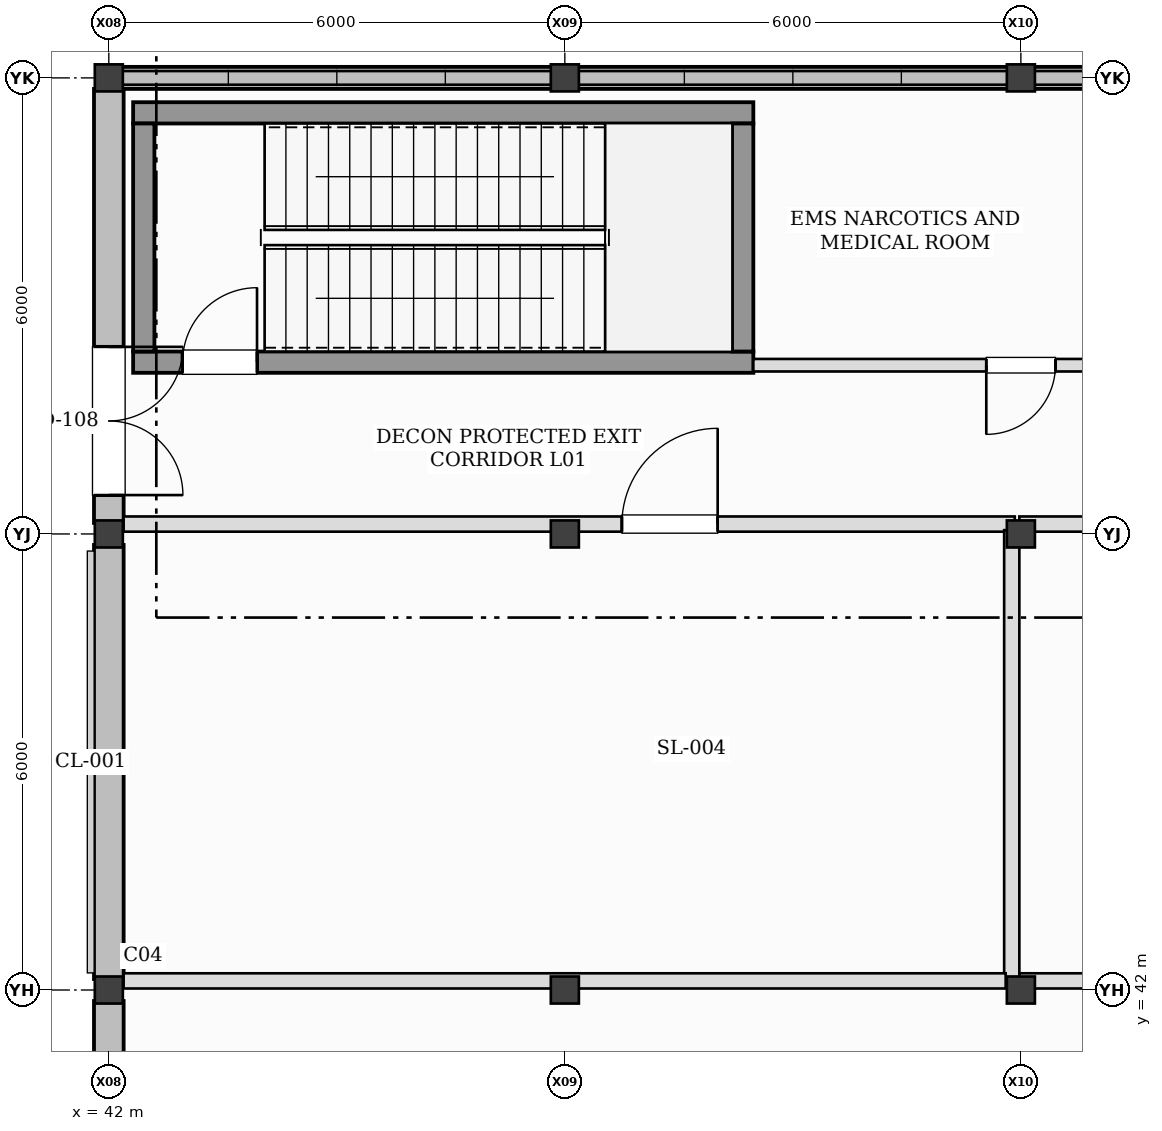
"""IFC4 building model, lengths in metres.
Left out: names, types, materials, properties, quantities, classifications, styles, units other than length and angle.
Written with IfcOpenShell. Run it as: python <this file> out.ifc"""

import sys

from ifc_helpers import new_model, si_unit, direction, frame, frame_2d, origin, origin_2d, place, context, subcontext, project, spatial, rectangle, i_section, extrude, element, fill, save


model = new_model("IFC4")
c1 = context("Model", 3, precision=1e-05, world=origin(), true_north=direction((0.0, 1.0)))
c2 = subcontext(c1, "Body", "Model", "MODEL_VIEW")
j1 = project(units=[si_unit("LENGTHUNIT", "METRE"), si_unit("PLANEANGLEUNIT", "RADIAN")], contexts=[c1])
p1 = place(None, origin())
s1 = spatial("IfcSite", under=j1, at=p1, CompositionType="ELEMENT")
p2 = place(p1, origin())
s2 = spatial("IfcBuilding", under=s1, at=p2, CompositionType="ELEMENT")
p3 = place(p2, origin())
s3 = spatial("IfcBuildingStorey", under=s2, at=p3, CompositionType="ELEMENT", Elevation=0.0)
for number, where, z_axis, x_axis in (
    (1, (42.0, 42.0, -0.41), (0.0, 0.0, 1.0), (1.0, 0.0, 0.0)),
    (2, (42.0, 48.0, -0.41), (0.0, 0.0, 1.0), (1.0, 0.0, 0.0)),
    (3, (42.0, 54.0, -0.41), (0.0, 0.0, 1.0), (1.0, 0.0, 0.0)),
    (4, (48.0, 42.0, -0.41), (0.0, 0.0, 1.0), (1.0, 0.0, 0.0)),
    (5, (48.0, 48.0, -0.41), (0.0, 0.0, 1.0), (1.0, 0.0, 0.0)),
    (6, (48.0, 54.0, -0.41), (0.0, 0.0, 1.0), (1.0, 0.0, 0.0)),
    (7, (54.0, 42.0, -0.41), (0.0, 0.0, 1.0), (1.0, 0.0, 0.0)),
    (8, (54.0, 48.0, -0.41), (0.0, 0.0, 1.0), (1.0, 0.0, 0.0)),
    (9, (54.0, 54.0, -0.41), (0.0, 0.0, 1.0), (1.0, 0.0, 0.0)),
):
    element("IfcColumn", number, at=place(p3, frame(where, z_axis=z_axis, x_axis=x_axis)), inside=s3, PredefinedType="COLUMN", context=c2, shape_type="SweptSolid", body=[
        extrude(i_section(OverallWidth=0.369, OverallDepth=0.356, WebThickness=0.011, FlangeThickness=0.018, at=origin_2d()), origin(), (0.0, 0.0, 1.0), 6.41),
    ])
p4 = place(p3, frame((47.855, 54.0, 0.0), z_axis=(0.0, 0.0, 1.0), x_axis=(-1.0, 0.0, 0.0)))
e10 = element("IfcWall", 10, at=p4, inside=s3, PredefinedType="STANDARD", context=c2, shape_type="SweptSolid", body=[
    extrude(rectangle(XDim=5.71, YDim=0.29, at=frame_2d((2.855, 0.0))), origin(), (0.0, 0.0, 1.0), 0.56),
])
p5 = place(p3, frame((53.855, 54.0, 0.0), z_axis=(0.0, 0.0, 1.0), x_axis=(-1.0, 0.0, 0.0)))
e11 = element("IfcWall", 11, at=p5, inside=s3, PredefinedType="STANDARD", context=c2, shape_type="SweptSolid", body=[
    extrude(rectangle(XDim=5.71, YDim=0.29, at=frame_2d((2.855, 0.0))), origin(), (0.0, 0.0, 1.0), 0.68),
])
p6 = place(p3, frame((59.855, 54.0, 0.0), z_axis=(0.0, 0.0, 1.0), x_axis=(-1.0, 0.0, 0.0)))
e12 = element("IfcWall", 12, at=p6, inside=s3, PredefinedType="STANDARD", context=c2, shape_type="SweptSolid", body=[
    extrude(rectangle(XDim=5.71, YDim=0.29, at=frame_2d((2.855, 0.0))), origin(), (0.0, 0.0, 1.0), 0.8),
])
p7 = place(p3, frame((42.0, 41.855, 0.0), z_axis=(0.0, 0.0, 1.0), x_axis=(0.0, -1.0, 0.0)))
e13 = element("IfcWall", 13, at=p7, inside=s3, PredefinedType="STANDARD", context=c2, shape_type="SweptSolid", body=[
    extrude(rectangle(XDim=5.71, YDim=0.39, at=frame_2d((2.855, 0.0))), origin(), (0.0, 0.0, 1.0), 6.0),
])
p8 = place(p7, frame((1.555, 0.0, 1.0)))
e14 = element("IfcOpeningElement", 14, at=p8, cuts=e13, PredefinedType="OPENING", context=c2, shape_type="SweptSolid", body=[
    extrude(rectangle(XDim=2.6, YDim=1.36, at=frame_2d((1.3, 0.68))), frame((0.0, 0.205, 0.0), z_axis=(0.0, -1.0, 0.0), x_axis=(1.0, 0.0, 0.0)), (0.0, 0.0, 1.0), 0.41),
])
p9 = place(p3, frame((42.0, 47.855, 0.0), z_axis=(0.0, 0.0, 1.0), x_axis=(0.0, -1.0, 0.0)))
e15 = element("IfcWall", 15, at=p9, inside=s3, PredefinedType="STANDARD", context=c2, shape_type="SweptSolid", body=[
    extrude(rectangle(XDim=5.71, YDim=0.39, at=frame_2d((2.855, 0.0))), origin(), (0.0, 0.0, 1.0), 5.044),
])
p10 = place(p3, frame((42.0, 53.855, 0.0), z_axis=(0.0, 0.0, 1.0), x_axis=(0.0, -1.0, 0.0)))
e16 = element("IfcWall", 16, at=p10, inside=s3, PredefinedType="STANDARD", context=c2, shape_type="SweptSolid", body=[
    extrude(rectangle(XDim=5.71, YDim=0.39, at=frame_2d((2.855, 0.0))), origin(), (0.0, 0.0, 1.0), 5.044),
])
p11 = place(p10, frame((3.394, 0.0, 0.0)))
e17 = element("IfcOpeningElement", 17, at=p11, cuts=e16, PredefinedType="OPENING", context=c2, shape_type="SweptSolid", body=[
    extrude(rectangle(XDim=1.95, YDim=2.35, at=frame_2d((0.975, 1.175))), frame((0.0, 0.205, 0.0), z_axis=(0.0, -1.0, 0.0), x_axis=(1.0, 0.0, 0.0)), (0.0, 0.0, 1.0), 0.41),
])
p12 = place(p3, frame((42.32, 50.26, 0.0), z_axis=(0.0, 0.0, 1.0), x_axis=(1.0, 0.0, 0.0)))
e18 = element("IfcWall", 18, at=p12, inside=s3, PredefinedType="SHEAR", context=c2, shape_type="SweptSolid", body=[
    extrude(rectangle(XDim=8.16, YDim=0.28, at=frame_2d((4.08, 0.0))), origin(), (0.0, 0.0, 1.0), 6.0),
])
p13 = place(p12, frame((0.65, 0.0, 0.0)))
e19 = element("IfcOpeningElement", 19, at=p13, cuts=e18, PredefinedType="OPENING", context=c2, shape_type="SweptSolid", body=[
    extrude(rectangle(XDim=0.98, YDim=2.15, at=frame_2d((0.49, 1.075))), frame((0.0, 0.15, 0.0), z_axis=(0.0, -1.0, 0.0), x_axis=(1.0, 0.0, 0.0)), (0.0, 0.0, 1.0), 0.3),
])
p14 = place(p3, frame((50.48, 53.54, 0.0), z_axis=(0.0, 0.0, 1.0), x_axis=(-1.0, 0.0, 0.0)))
e20 = element("IfcWall", 20, at=p14, inside=s3, PredefinedType="SHEAR", context=c2, shape_type="SweptSolid", body=[
    extrude(rectangle(XDim=8.16, YDim=0.28, at=frame_2d((4.08, 0.0))), origin(), (0.0, 0.0, 1.0), 6.0),
])
for number, where, z_axis, x_axis in (
    (21, (42.46, 53.4, 0.0), (0.0, 0.0, 1.0), (0.0, -1.0, 0.0)),
    (22, (50.34, 50.4, 0.0), (0.0, 0.0, 1.0), (0.0, 1.0, 0.0)),
):
    element("IfcWall", number, at=place(p3, frame(where, z_axis=z_axis, x_axis=x_axis)), inside=s3, PredefinedType="SHEAR", context=c2, shape_type="SweptSolid", body=[
        extrude(rectangle(XDim=3.0, YDim=0.28, at=frame_2d((1.5, 0.0))), origin(), (0.0, 0.0, 1.0), 6.0),
    ])
p15 = place(p3, frame((42.195, 48.13, 0.0), z_axis=(0.0, 0.0, 1.0), x_axis=(1.0, 0.0, 0.0)))
e23 = element("IfcWall", 23, at=p15, inside=s3, PredefinedType="PARTITIONING", context=c2, shape_type="SweptSolid", body=[
    extrude(rectangle(XDim=11.725, YDim=0.2, at=frame_2d((5.862, 0.0))), origin(), (0.0, 0.0, 1.0), 5.035),
])
p16 = place(p15, frame((6.556, 0.0, 0.0)))
e24 = element("IfcOpeningElement", 24, at=p16, cuts=e23, PredefinedType="OPENING", context=c2, shape_type="SweptSolid", body=[
    extrude(rectangle(XDim=1.26, YDim=2.2, at=frame_2d((0.63, 1.1))), frame((0.0, 0.11, 0.0), z_axis=(0.0, -1.0, 0.0), x_axis=(1.0, 0.0, 0.0)), (0.0, 0.0, 1.0), 0.22),
])
p17 = place(p3, frame((53.88, 48.05, 0.0), z_axis=(0.0, 0.0, 1.0), x_axis=(0.0, -1.0, 0.0)))
e25 = element("IfcWall", 25, at=p17, inside=s3, PredefinedType="PARTITIONING", context=c2, shape_type="SweptSolid", body=[
    extrude(rectangle(XDim=5.97, YDim=0.2, at=frame_2d((2.985, 0.0))), origin(), (0.0, 0.0, 1.0), 5.044),
])
p18 = place(p3, frame((53.8, 42.12, 0.0), z_axis=(0.0, 0.0, 1.0), x_axis=(-1.0, 0.0, 0.0)))
e26 = element("IfcWall", 26, at=p18, inside=s3, PredefinedType="PARTITIONING", context=c2, shape_type="SweptSolid", body=[
    extrude(rectangle(XDim=11.605, YDim=0.2, at=frame_2d((5.802, 0.0))), origin(), (0.0, 0.0, 1.0), 5.035),
])
p19 = place(p3, frame((53.98, 48.13, 0.0), z_axis=(0.0, 0.0, 1.0), x_axis=(1.0, 0.0, 0.0)))
e27 = element("IfcWall", 27, at=p19, inside=s3, PredefinedType="PARTITIONING", context=c2, shape_type="SweptSolid", body=[
    extrude(rectangle(XDim=11.94, YDim=0.2, at=frame_2d((5.97, 0.0))), origin(), (0.0, 0.0, 1.0), 5.035),
])
p20 = place(p19, frame((3.915, 0.0, 0.0)))
e28 = element("IfcOpeningElement", 28, at=p20, cuts=e27, PredefinedType="OPENING", context=c2, shape_type="SweptSolid", body=[
    extrude(rectangle(XDim=1.46, YDim=2.3, at=frame_2d((0.73, 1.15))), frame((0.0, 0.11, 0.0), z_axis=(0.0, -1.0, 0.0), x_axis=(1.0, 0.0, 0.0)), (0.0, 0.0, 1.0), 0.22),
])
p21 = place(p3, frame((65.8, 42.12, 0.0), z_axis=(0.0, 0.0, 1.0), x_axis=(-1.0, 0.0, 0.0)))
e29 = element("IfcWall", 29, at=p21, inside=s3, PredefinedType="PARTITIONING", context=c2, shape_type="SweptSolid", body=[
    extrude(rectangle(XDim=11.82, YDim=0.2, at=frame_2d((5.91, 0.0))), origin(), (0.0, 0.0, 1.0), 5.035),
])
p22 = place(p3, frame((57.52, 50.22, 0.0), z_axis=(0.0, 0.0, 1.0), x_axis=(-1.0, 0.0, 0.0)))
e30 = element("IfcWall", 30, at=p22, inside=s3, PredefinedType="PARTITIONING", context=c2, shape_type="SweptSolid", body=[
    extrude(rectangle(XDim=7.04, YDim=0.165, at=frame_2d((3.52, 0.0))), origin(), (0.0, 0.0, 1.0), 5.68),
])
p23 = place(p22, frame((3.065, 0.0, 0.0)))
e31 = element("IfcOpeningElement", 31, at=p23, cuts=e30, PredefinedType="OPENING", context=c2, shape_type="SweptSolid", body=[
    extrude(rectangle(XDim=0.91, YDim=2.1, at=frame_2d((0.455, 1.05))), frame((0.0, 0.093, 0.0), z_axis=(0.0, -1.0, 0.0), x_axis=(1.0, 0.0, 0.0)), (0.0, 0.0, 1.0), 0.185),
])
p24 = place(p11, frame((1.95, 0.0, 0.0), z_axis=(0.0, 0.0, 1.0), x_axis=(-1.0, 0.0, 0.0)))
e32 = element("IfcDoor", 32, at=p24, inside=s3, OperationType="DOUBLE_DOOR_SINGLE_SWING", PredefinedType="DOOR", context=c2, shape_type="SweptSolid", body=[
    extrude(rectangle(XDim=1.95, YDim=2.35, at=frame_2d((0.975, 1.175))), frame((0.0, 0.025, 0.0), z_axis=(0.0, -1.0, 0.0), x_axis=(1.0, 0.0, 0.0)), (0.0, 0.0, 1.0), 0.05),
])
fill(e17, e32)
p25 = place(p13, origin())
e33 = element("IfcDoor", 33, at=p25, inside=s3, OperationType="SINGLE_SWING_RIGHT", PredefinedType="DOOR", context=c2, shape_type="SweptSolid", body=[
    extrude(rectangle(XDim=0.98, YDim=2.15, at=frame_2d((0.49, 1.075))), frame((0.0, 0.025, 0.0), z_axis=(0.0, -1.0, 0.0), x_axis=(1.0, 0.0, 0.0)), (0.0, 0.0, 1.0), 0.05),
])
fill(e19, e33)
p26 = place(p16, frame((1.26, 0.0, 0.0), z_axis=(0.0, 0.0, 1.0), x_axis=(-1.0, 0.0, 0.0)))
e34 = element("IfcDoor", 34, at=p26, inside=s3, OperationType="SINGLE_SWING_RIGHT", PredefinedType="DOOR", context=c2, shape_type="SweptSolid", body=[
    extrude(rectangle(XDim=1.26, YDim=2.2, at=frame_2d((0.63, 1.1))), frame((0.0, 0.025, 0.0), z_axis=(0.0, -1.0, 0.0), x_axis=(1.0, 0.0, 0.0)), (0.0, 0.0, 1.0), 0.05),
])
fill(e24, e34)
p27 = place(p23, frame((0.91, 0.0, 0.0), z_axis=(0.0, 0.0, 1.0), x_axis=(-1.0, 0.0, 0.0)))
e35 = element("IfcDoor", 35, at=p27, inside=s3, OperationType="SINGLE_SWING_RIGHT", PredefinedType="DOOR", context=c2, shape_type="SweptSolid", body=[
    extrude(rectangle(XDim=0.91, YDim=2.1, at=frame_2d((0.455, 1.05))), frame((0.0, 0.025, 0.0), z_axis=(0.0, -1.0, 0.0), x_axis=(1.0, 0.0, 0.0)), (0.0, 0.0, 1.0), 0.05),
])
fill(e31, e35)
save(model, sys.argv[1])
